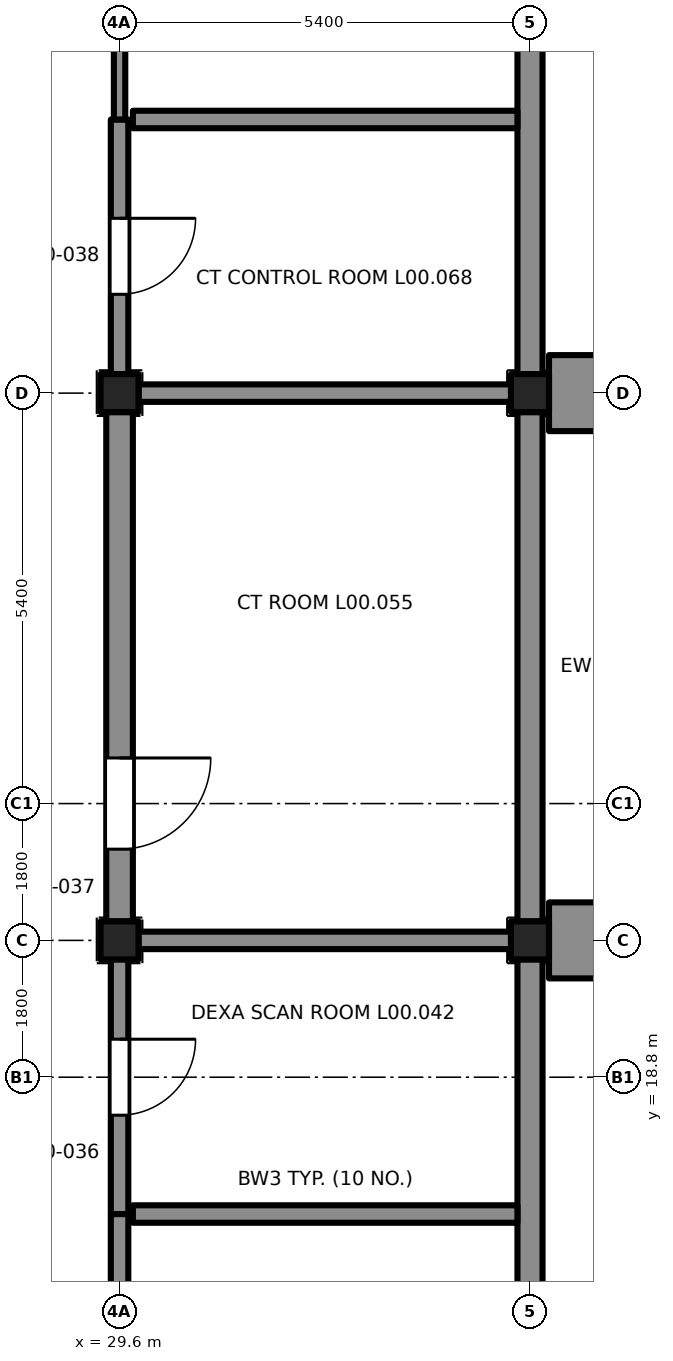
"""IFC4 building model, lengths in metres.
Left out: names, types, materials, properties, quantities, classifications, styles, units other than length and angle.
Written with IfcOpenShell. Run it as: python <this file> out.ifc"""

import sys

from ifc_helpers import new_model, si_unit, direction, frame, frame_2d, origin, origin_2d, place, context, subcontext, project, spatial, rectangle, extrude, element, fill, save


model = new_model("IFC4")
c1 = context("Model", 3, precision=1e-05, world=origin(), true_north=direction((0.0, 1.0)))
c2 = subcontext(c1, "Body", "Model", "MODEL_VIEW")
j1 = project(units=[si_unit("LENGTHUNIT", "METRE"), si_unit("PLANEANGLEUNIT", "RADIAN")], contexts=[c1])
p1 = place(None, origin())
s1 = spatial("IfcSite", under=j1, at=p1, CompositionType="ELEMENT")
p2 = place(p1, origin())
s2 = spatial("IfcBuilding", under=s1, at=p2, CompositionType="ELEMENT")
p3 = place(p2, origin())
s3 = spatial("IfcBuildingStorey", under=s2, at=p3, CompositionType="ELEMENT", Elevation=0.0)
for number, where, z_axis, x_axis in (
    (1, (29.6, 20.6, -0.2), (0.0, 0.0, 1.0), (1.0, 0.0, 0.0)),
    (2, (29.6, 27.8, -0.2), (0.0, 0.0, 1.0), (1.0, 0.0, 0.0)),
    (3, (35.0, 20.6, -0.2), (0.0, 0.0, 1.0), (1.0, 0.0, 0.0)),
    (4, (35.0, 27.8, -0.2), (0.0, 0.0, 1.0), (1.0, 0.0, 0.0)),
):
    element("IfcColumn", number, at=place(p3, frame(where, z_axis=z_axis, x_axis=x_axis)), inside=s3, PredefinedType="COLUMN", context=c2, shape_type="SweptSolid", body=[
        extrude(rectangle(XDim=0.5, YDim=0.5, at=origin_2d()), origin(), (0.0, 0.0, 1.0), 5.45),
    ])
p4 = place(p3, frame((35.0, 20.35, 0.0), z_axis=(0.0, 0.0, 1.0), x_axis=(0.0, -1.0, 0.0)))
e5 = element("IfcWall", 5, at=p4, inside=s3, PredefinedType="SOLIDWALL", context=c2, shape_type="SweptSolid", body=[
    extrude(rectangle(XDim=6.7, YDim=0.33, at=frame_2d((3.35, 0.0))), origin(), (0.0, 0.0, 1.0), 5.25),
])
p5 = place(p3, frame((35.0, 27.55, 0.0), z_axis=(0.0, 0.0, 1.0), x_axis=(0.0, -1.0, 0.0)))
e6 = element("IfcWall", 6, at=p5, inside=s3, PredefinedType="SOLIDWALL", context=c2, shape_type="SweptSolid", body=[
    extrude(rectangle(XDim=6.7, YDim=0.33, at=frame_2d((3.35, 0.0))), origin(), (0.0, 0.0, 1.0), 5.25),
])
p6 = place(p3, frame((35.0, 34.75, 0.0), z_axis=(0.0, 0.0, 1.0), x_axis=(0.0, -1.0, 0.0)))
e7 = element("IfcWall", 7, at=p6, inside=s3, PredefinedType="SOLIDWALL", context=c2, shape_type="SweptSolid", body=[
    extrude(rectangle(XDim=6.7, YDim=0.33, at=frame_2d((3.35, 0.0))), origin(), (0.0, 0.0, 1.0), 5.25),
])
p7 = place(p6, frame((0.95, 0.0, 0.9)))
e8 = element("IfcOpeningElement", 8, at=p7, cuts=e7, PredefinedType="OPENING", context=c2, shape_type="SweptSolid", body=[
    extrude(rectangle(XDim=1.2, YDim=1.5, at=frame_2d((0.6, 0.75))), frame((0.0, 0.175, 0.0), z_axis=(0.0, -1.0, 0.0), x_axis=(1.0, 0.0, 0.0)), (0.0, 0.0, 1.0), 0.35),
])
for number, where, z_axis, x_axis in (
    (9, (35.625, 21.1, 0.0), (0.0, 0.0, 1.0), (0.0, -1.0, 0.0)),
    (10, (35.625, 28.3, 0.0), (0.0, 0.0, 1.0), (0.0, -1.0, 0.0)),
):
    element("IfcWall", number, at=place(p3, frame(where, z_axis=z_axis, x_axis=x_axis)), inside=s3, PredefinedType="SOLIDWALL", context=c2, shape_type="SweptSolid", body=[
        extrude(rectangle(XDim=1.0, YDim=0.75, at=frame_2d((0.5, 0.0))), origin(), (0.0, 0.0, 1.0), 6.3),
    ])
p8 = place(p3, frame((29.6, 17.0, 0.0), z_axis=(0.0, 0.0, 1.0), x_axis=(0.0, -1.0, 0.0)))
e11 = element("IfcWall", 11, at=p8, inside=s3, PredefinedType="SOLIDWALL", context=c2, shape_type="SweptSolid", body=[
    extrude(rectangle(XDim=3.35, YDim=0.23, at=frame_2d((1.675, 0.0))), origin(), (0.0, 0.0, 1.0), 5.25),
])
p9 = place(p8, frame((1.3, 0.0, 0.0)))
e12 = element("IfcOpeningElement", 12, at=p9, cuts=e11, PredefinedType="OPENING", context=c2, shape_type="SweptSolid", body=[
    extrude(rectangle(XDim=1.0, YDim=2.1, at=frame_2d((0.5, 1.05))), frame((0.0, 0.125, 0.0), z_axis=(0.0, -1.0, 0.0), x_axis=(1.0, 0.0, 0.0)), (0.0, 0.0, 1.0), 0.25),
])
p10 = place(p3, frame((29.6, 20.35, 0.0), z_axis=(0.0, 0.0, 1.0), x_axis=(0.0, -1.0, 0.0)))
e13 = element("IfcWall", 13, at=p10, inside=s3, PredefinedType="SOLIDWALL", context=c2, shape_type="SweptSolid", body=[
    extrude(rectangle(XDim=3.35, YDim=0.23, at=frame_2d((1.675, 0.0))), origin(), (0.0, 0.0, 1.0), 5.25),
])
p11 = place(p10, frame((1.05, 0.0, 0.0)))
e14 = element("IfcOpeningElement", 14, at=p11, cuts=e13, PredefinedType="OPENING", context=c2, shape_type="SweptSolid", body=[
    extrude(rectangle(XDim=1.0, YDim=2.1, at=frame_2d((0.5, 1.05))), frame((0.0, 0.125, 0.0), z_axis=(0.0, -1.0, 0.0), x_axis=(1.0, 0.0, 0.0)), (0.0, 0.0, 1.0), 0.25),
])
p12 = place(p3, frame((34.835, 17.0, 0.0), z_axis=(0.0, 0.0, 1.0), x_axis=(-1.0, 0.0, 0.0)))
e15 = element("IfcWall", 15, at=p12, inside=s3, PredefinedType="SOLIDWALL", context=c2, shape_type="SweptSolid", body=[
    extrude(rectangle(XDim=5.06, YDim=0.23, at=frame_2d((2.53, 0.0))), origin(), (0.0, 0.0, 1.0), 6.05),
])
p13 = place(p3, frame((29.6, 27.55, 0.0), z_axis=(0.0, 0.0, 1.0), x_axis=(0.0, -1.0, 0.0)))
e16 = element("IfcWall", 16, at=p13, inside=s3, PredefinedType="SOLIDWALL", context=c2, shape_type="SweptSolid", body=[
    extrude(rectangle(XDim=6.7, YDim=0.35, at=frame_2d((3.35, 0.0))), origin(), (0.0, 0.0, 1.0), 5.25),
])
p14 = place(p13, frame((4.55, 0.0, 0.0)))
e17 = element("IfcOpeningElement", 17, at=p14, cuts=e16, PredefinedType="OPENING", context=c2, shape_type="SweptSolid", body=[
    extrude(rectangle(XDim=1.2, YDim=2.1, at=frame_2d((0.6, 1.05))), frame((0.0, 0.185, 0.0), z_axis=(0.0, -1.0, 0.0), x_axis=(1.0, 0.0, 0.0)), (0.0, 0.0, 1.0), 0.37),
])
p15 = place(p3, frame((34.75, 20.6, 0.0), z_axis=(0.0, 0.0, 1.0), x_axis=(-1.0, 0.0, 0.0)))
e18 = element("IfcWall", 18, at=p15, inside=s3, PredefinedType="SOLIDWALL", context=c2, shape_type="SweptSolid", body=[
    extrude(rectangle(XDim=4.9, YDim=0.23, at=frame_2d((2.45, 0.0))), origin(), (0.0, 0.0, 1.0), 6.05),
])
p16 = place(p3, frame((29.6, 31.4, 0.0), z_axis=(0.0, 0.0, 1.0), x_axis=(0.0, -1.0, 0.0)))
e19 = element("IfcWall", 19, at=p16, inside=s3, PredefinedType="SOLIDWALL", context=c2, shape_type="SweptSolid", body=[
    extrude(rectangle(XDim=3.35, YDim=0.23, at=frame_2d((1.675, 0.0))), origin(), (0.0, 0.0, 1.0), 5.25),
])
p17 = place(p16, frame((1.3, 0.0, 0.0)))
e20 = element("IfcOpeningElement", 20, at=p17, cuts=e19, PredefinedType="OPENING", context=c2, shape_type="SweptSolid", body=[
    extrude(rectangle(XDim=1.0, YDim=2.1, at=frame_2d((0.5, 1.05))), frame((0.0, 0.125, 0.0), z_axis=(0.0, -1.0, 0.0), x_axis=(1.0, 0.0, 0.0)), (0.0, 0.0, 1.0), 0.25),
])
p18 = place(p3, frame((34.75, 27.8, 0.0), z_axis=(0.0, 0.0, 1.0), x_axis=(-1.0, 0.0, 0.0)))
e21 = element("IfcWall", 21, at=p18, inside=s3, PredefinedType="SOLIDWALL", context=c2, shape_type="SweptSolid", body=[
    extrude(rectangle(XDim=4.9, YDim=0.23, at=frame_2d((2.45, 0.0))), origin(), (0.0, 0.0, 1.0), 6.05),
])
p19 = place(p3, frame((29.6, 34.75, 0.0), z_axis=(0.0, 0.0, 1.0), x_axis=(0.0, -1.0, 0.0)))
e22 = element("IfcWall", 22, at=p19, inside=s3, PredefinedType="PARTITIONING", context=c2, shape_type="SweptSolid", body=[
    extrude(rectangle(XDim=3.35, YDim=0.15, at=frame_2d((1.675, 0.0))), origin(), (0.0, 0.0, 1.0), 5.25),
])
p20 = place(p19, frame((1.05, 0.0, 0.0)))
e23 = element("IfcOpeningElement", 23, at=p20, cuts=e22, PredefinedType="OPENING", context=c2, shape_type="SweptSolid", body=[
    extrude(rectangle(XDim=1.0, YDim=2.1, at=frame_2d((0.5, 1.05))), frame((0.0, 0.085, 0.0), z_axis=(0.0, -1.0, 0.0), x_axis=(1.0, 0.0, 0.0)), (0.0, 0.0, 1.0), 0.17),
])
p21 = place(p3, frame((34.835, 31.4, 0.0), z_axis=(0.0, 0.0, 1.0), x_axis=(-1.0, 0.0, 0.0)))
e24 = element("IfcWall", 24, at=p21, inside=s3, PredefinedType="SOLIDWALL", context=c2, shape_type="SweptSolid", body=[
    extrude(rectangle(XDim=5.06, YDim=0.23, at=frame_2d((2.53, 0.0))), origin(), (0.0, 0.0, 1.0), 6.05),
])
p22 = place(p11, origin())
e25 = element("IfcDoor", 25, at=p22, inside=s3, OperationType="SINGLE_SWING_LEFT", PredefinedType="DOOR", context=c2, shape_type="SweptSolid", body=[
    extrude(rectangle(XDim=1.0, YDim=2.1, at=frame_2d((0.5, 1.05))), frame((0.0, 0.025, 0.0), z_axis=(0.0, -1.0, 0.0), x_axis=(1.0, 0.0, 0.0)), (0.0, 0.0, 1.0), 0.05),
])
fill(e14, e25)
p23 = place(p14, origin())
e26 = element("IfcDoor", 26, at=p23, inside=s3, OperationType="SINGLE_SWING_RIGHT", PredefinedType="DOOR", context=c2, shape_type="SweptSolid", body=[
    extrude(rectangle(XDim=1.2, YDim=2.1, at=frame_2d((0.6, 1.05))), frame((0.0, 0.025, 0.0), z_axis=(0.0, -1.0, 0.0), x_axis=(1.0, 0.0, 0.0)), (0.0, 0.0, 1.0), 0.05),
])
fill(e17, e26)
p24 = place(p17, origin())
e27 = element("IfcDoor", 27, at=p24, inside=s3, OperationType="SINGLE_SWING_RIGHT", PredefinedType="DOOR", context=c2, shape_type="SweptSolid", body=[
    extrude(rectangle(XDim=1.0, YDim=2.1, at=frame_2d((0.5, 1.05))), frame((0.0, 0.025, 0.0), z_axis=(0.0, -1.0, 0.0), x_axis=(1.0, 0.0, 0.0)), (0.0, 0.0, 1.0), 0.05),
])
fill(e20, e27)
save(model, sys.argv[1])
